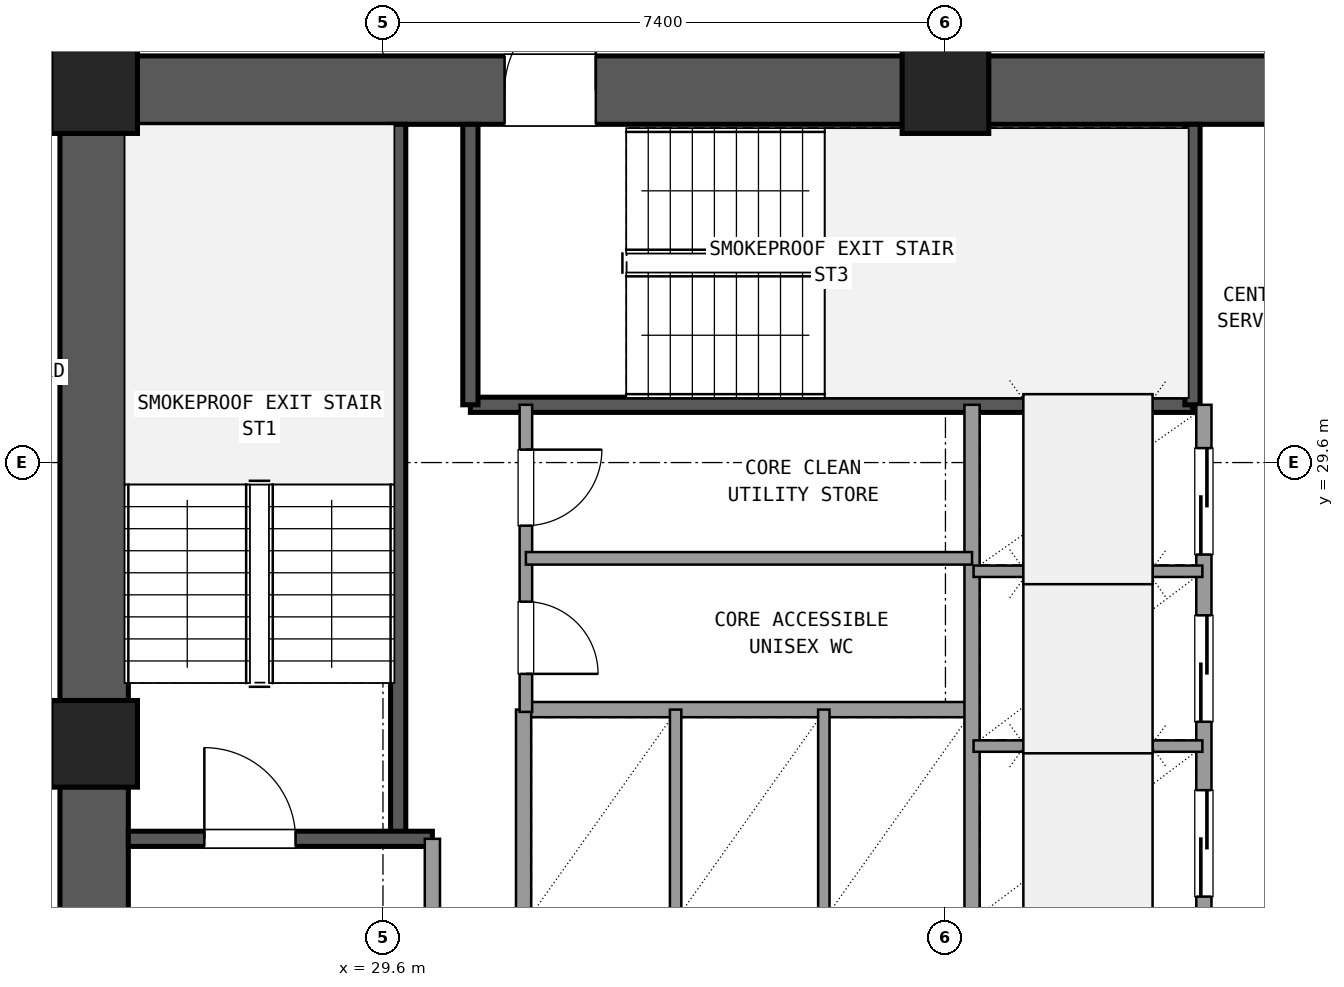
"""IFC4 building model, lengths in metres.
Left out: names, types, materials, properties, quantities, classifications, styles, units other than length and angle.
Written with IfcOpenShell. Run it as: python <this file> out.ifc"""

import sys

from ifc_helpers import new_model, si_unit, direction, frame, frame_2d, origin, origin_2d, place, context, subcontext, project, spatial, rectangle, extrude, element, fill, save


model = new_model("IFC4")
c1 = context("Model", 3, precision=1e-05, world=origin(), true_north=direction((0.0, 1.0)))
c2 = subcontext(c1, "Body", "Model", "MODEL_VIEW")
j1 = project(units=[si_unit("LENGTHUNIT", "METRE"), si_unit("PLANEANGLEUNIT", "RADIAN")], contexts=[c1])
p1 = place(None, origin())
s1 = spatial("IfcSite", under=j1, at=p1, CompositionType="ELEMENT")
p2 = place(p1, origin())
s2 = spatial("IfcBuilding", under=s1, at=p2, CompositionType="ELEMENT")
p3 = place(p2, frame((0.0, 0.0, 63.54)))
s3 = spatial("IfcBuildingStorey", under=s2, at=p3, CompositionType="ELEMENT", Elevation=63.54)
for number, where, z_axis, x_axis in (
    (1, (37.0, 34.5, 0.0), (0.0, 0.0, 1.0), (1.0, 0.0, 0.0)),
    (2, (25.8, 34.5, 0.0), (0.0, 0.0, 1.0), (1.0, 0.0, 0.0)),
    (3, (25.8, 25.9, 0.0), (0.0, 0.0, 1.0), (1.0, 0.0, 0.0)),
):
    element("IfcColumn", number, at=place(p3, frame(where, z_axis=z_axis, x_axis=x_axis)), inside=s3, PredefinedType="COLUMN", context=c2, shape_type="SweptSolid", body=[
        extrude(rectangle(XDim=1.14, YDim=1.14, at=origin_2d()), origin(), (0.0, 0.0, 1.0), 3.6),
    ])
p4 = place(p3, frame((47.635, 34.5, 0.0), z_axis=(0.0, 0.0, 1.0), x_axis=(-1.0, 0.0, 0.0)))
e4 = element("IfcWall", 4, at=p4, inside=s3, PredefinedType="SHEAR", context=c2, shape_type="SweptSolid", body=[
    extrude(rectangle(XDim=10.07, YDim=0.9, at=frame_2d((5.035, 0.0))), origin(), (0.0, 0.0, 1.0), 3.32),
])
p5 = place(p4, frame((4.535, 0.0, 0.0)))
e5 = element("IfcOpeningElement", 5, at=p5, cuts=e4, PredefinedType="OPENING", context=c2, shape_type="SweptSolid", body=[
    extrude(rectangle(XDim=1.6, YDim=2.2, at=frame_2d((0.8, 1.1))), frame((0.0, 0.46, 0.0), z_axis=(0.0, -1.0, 0.0), x_axis=(1.0, 0.0, 0.0)), (0.0, 0.0, 1.0), 0.92),
])
p6 = place(p3, frame((36.435, 34.5, 0.0), z_axis=(0.0, 0.0, 1.0), x_axis=(-1.0, 0.0, 0.0)))
e6 = element("IfcWall", 6, at=p6, inside=s3, PredefinedType="SHEAR", context=c2, shape_type="SweptSolid", body=[
    extrude(rectangle(XDim=10.07, YDim=0.9, at=frame_2d((5.035, 0.0))), origin(), (0.0, 0.0, 1.0), 3.32),
])
p7 = place(p6, frame((4.035, 0.0, 0.0)))
e7 = element("IfcOpeningElement", 7, at=p7, cuts=e6, PredefinedType="OPENING", context=c2, shape_type="SweptSolid", body=[
    extrude(rectangle(XDim=1.2, YDim=2.15, at=frame_2d((0.6, 1.075))), frame((0.0, 0.46, 0.0), z_axis=(0.0, -1.0, 0.0), x_axis=(1.0, 0.0, 0.0)), (0.0, 0.0, 1.0), 0.92),
])
p8 = place(p3, frame((25.8, 33.935, 0.0), z_axis=(0.0, 0.0, 1.0), x_axis=(0.0, -1.0, 0.0)))
e8 = element("IfcWall", 8, at=p8, inside=s3, PredefinedType="SHEAR", context=c2, shape_type="SweptSolid", body=[
    extrude(rectangle(XDim=7.47, YDim=0.9, at=frame_2d((3.735, 0.0))), origin(), (0.0, 0.0, 1.0), 3.32),
])
p9 = place(p3, frame((25.8, 25.335, 0.0), z_axis=(0.0, 0.0, 1.0), x_axis=(0.0, -1.0, 0.0)))
e9 = element("IfcWall", 9, at=p9, inside=s3, PredefinedType="SHEAR", context=c2, shape_type="SweptSolid", body=[
    extrude(rectangle(XDim=7.47, YDim=0.9, at=frame_2d((3.735, 0.0))), origin(), (0.0, 0.0, 1.0), 3.32),
])
p10 = place(p9, frame((2.085, 0.0, 0.0)))
e10 = element("IfcOpeningElement", 10, at=p10, cuts=e9, PredefinedType="OPENING", context=c2, shape_type="SweptSolid", body=[
    extrude(rectangle(XDim=1.2, YDim=2.15, at=frame_2d((0.6, 1.075))), frame((0.0, 0.46, 0.0), z_axis=(0.0, -1.0, 0.0), x_axis=(1.0, 0.0, 0.0)), (0.0, 0.0, 1.0), 0.92),
])
p11 = place(p3, frame((29.8, 24.65, 0.0), z_axis=(0.0, 0.0, 1.0), x_axis=(0.0, 1.0, 0.0)))
e11 = element("IfcWall", 11, at=p11, inside=s3, PredefinedType="SHEAR", context=c2, shape_type="SweptSolid", body=[
    extrude(rectangle(XDim=9.4, YDim=0.2, at=frame_2d((4.7, 0.0))), origin(), (0.0, 0.0, 1.0), 3.32),
])
p12 = place(p3, frame((26.25, 24.65, 0.0), z_axis=(0.0, 0.0, 1.0), x_axis=(1.0, 0.0, 0.0)))
e12 = element("IfcWall", 12, at=p12, inside=s3, PredefinedType="SHEAR", context=c2, shape_type="SweptSolid", body=[
    extrude(rectangle(XDim=4.0, YDim=0.2, at=frame_2d((2.0, 0.0))), origin(), (0.0, 0.0, 1.0), 3.32),
])
p13 = place(p12, frame((1.0, 0.0, 0.0)))
e13 = element("IfcOpeningElement", 13, at=p13, cuts=e12, PredefinedType="OPENING", context=c2, shape_type="SweptSolid", body=[
    extrude(rectangle(XDim=1.2, YDim=2.15, at=frame_2d((0.6, 1.075))), frame((0.0, 0.11, 0.0), z_axis=(0.0, -1.0, 0.0), x_axis=(1.0, 0.0, 0.0)), (0.0, 0.0, 1.0), 0.22),
])
p14 = place(p3, frame((30.75, 30.36, 0.0), z_axis=(0.0, 0.0, 1.0), x_axis=(1.0, 0.0, 0.0)))
e14 = element("IfcWall", 14, at=p14, inside=s3, PredefinedType="SHEAR", context=c2, shape_type="SweptSolid", body=[
    extrude(rectangle(XDim=9.5, YDim=0.2, at=frame_2d((4.75, 0.0))), origin(), (0.0, 0.0, 1.0), 3.32),
])
for number, where, z_axis, x_axis in (
    (15, (30.75, 30.36, 0.0), (0.0, 0.0, 1.0), (0.0, 1.0, 0.0)),
    (16, (40.25, 30.36, 0.0), (0.0, 0.0, 1.0), (0.0, 1.0, 0.0)),
):
    element("IfcWall", number, at=place(p3, frame(where, z_axis=z_axis, x_axis=x_axis)), inside=s3, PredefinedType="SHEAR", context=c2, shape_type="SweptSolid", body=[
        extrude(rectangle(XDim=3.69, YDim=0.2, at=frame_2d((1.845, 0.0))), origin(), (0.0, 0.0, 1.0), 3.32),
    ])
p15 = place(p3, frame((30.25, 17.75, 0.0), z_axis=(0.0, 0.0, 1.0), x_axis=(0.0, 1.0, 0.0)))
e17 = element("IfcWall", 17, at=p15, inside=s3, PredefinedType="SOLIDWALL", context=c2, shape_type="SweptSolid", body=[
    extrude(rectangle(XDim=6.9, YDim=0.2, at=frame_2d((3.45, 0.0))), origin(), (0.0, 0.0, 1.0), 2.61),
])
p16 = place(p15, frame((4.15, 0.0, 0.0)))
e18 = element("IfcOpeningElement", 18, at=p16, cuts=e17, PredefinedType="OPENING", context=c2, shape_type="SweptSolid", body=[
    extrude(rectangle(XDim=1.2, YDim=2.15, at=frame_2d((0.6, 1.075))), frame((0.0, 0.11, 0.0), z_axis=(0.0, -1.0, 0.0), x_axis=(1.0, 0.0, 0.0)), (0.0, 0.0, 1.0), 0.22),
])
p17 = place(p3, frame((31.45, 26.35, 0.0), z_axis=(0.0, 0.0, 1.0), x_axis=(1.0, 0.0, 0.0)))
e19 = element("IfcWall", 19, at=p17, inside=s3, PredefinedType="SOLIDWALL", context=c2, shape_type="SweptSolid", body=[
    extrude(rectangle(XDim=5.9, YDim=0.2, at=frame_2d((2.95, 0.0))), origin(), (0.0, 0.0, 1.0), 2.61),
])
p18 = place(p3, frame((31.45, 23.54, 0.0), z_axis=(0.0, 0.0, 1.0), x_axis=(0.0, 1.0, 0.0)))
e20 = element("IfcWall", 20, at=p18, inside=s3, PredefinedType="SOLIDWALL", context=c2, shape_type="SweptSolid", body=[
    extrude(rectangle(XDim=2.81, YDim=0.2, at=frame_2d((1.405, 0.0))), origin(), (0.0, 0.0, 1.0), 2.61),
])
for number, where, z_axis, x_axis in (
    (21, (33.45, 23.54, 0.0), (0.0, 0.0, 1.0), (0.0, 1.0, 0.0)),
    (22, (35.4, 23.54, 0.0), (0.0, 0.0, 1.0), (0.0, 1.0, 0.0)),
):
    element("IfcWall", number, at=place(p3, frame(where, z_axis=z_axis, x_axis=x_axis)), inside=s3, PredefinedType="PARTITIONING", context=c2, shape_type="SweptSolid", body=[
        extrude(rectangle(XDim=2.81, YDim=0.15, at=frame_2d((1.405, 0.0))), origin(), (0.0, 0.0, 1.0), 2.61),
    ])
p19 = place(p3, frame((37.35, 23.54, 0.0), z_axis=(0.0, 0.0, 1.0), x_axis=(0.0, 1.0, 0.0)))
e23 = element("IfcWall", 23, at=p19, inside=s3, PredefinedType="SOLIDWALL", context=c2, shape_type="SweptSolid", body=[
    extrude(rectangle(XDim=6.82, YDim=0.2, at=frame_2d((3.41, 0.0))), origin(), (0.0, 0.0, 1.0), 2.61),
])
p20 = place(p3, frame((40.4, 23.54, 0.0), z_axis=(0.0, 0.0, 1.0), x_axis=(0.0, 1.0, 0.0)))
e24 = element("IfcWall", 24, at=p20, inside=s3, PredefinedType="SOLIDWALL", context=c2, shape_type="SweptSolid", body=[
    extrude(rectangle(XDim=6.82, YDim=0.2, at=frame_2d((3.41, 0.0))), origin(), (0.0, 0.0, 1.0), 2.61),
])
p21 = place(p20, frame((0.35, 0.0, 0.0)))
e25 = element("IfcOpeningElement", 25, at=p21, cuts=e24, PredefinedType="OPENING", context=c2, shape_type="SweptSolid", body=[
    extrude(rectangle(XDim=1.4, YDim=2.2, at=frame_2d((0.7, 1.1))), frame((0.0, 0.11, 0.0), z_axis=(0.0, -1.0, 0.0), x_axis=(1.0, 0.0, 0.0)), (0.0, 0.0, 1.0), 0.22),
])
p22 = place(p20, frame((2.65, 0.0, 0.0)))
e26 = element("IfcOpeningElement", 26, at=p22, cuts=e24, PredefinedType="OPENING", context=c2, shape_type="SweptSolid", body=[
    extrude(rectangle(XDim=1.4, YDim=2.2, at=frame_2d((0.7, 1.1))), frame((0.0, 0.11, 0.0), z_axis=(0.0, -1.0, 0.0), x_axis=(1.0, 0.0, 0.0)), (0.0, 0.0, 1.0), 0.22),
])
p23 = place(p20, frame((4.85, 0.0, 0.0)))
e27 = element("IfcOpeningElement", 27, at=p23, cuts=e24, PredefinedType="OPENING", context=c2, shape_type="SweptSolid", body=[
    extrude(rectangle(XDim=1.4, YDim=2.2, at=frame_2d((0.7, 1.1))), frame((0.0, 0.11, 0.0), z_axis=(0.0, -1.0, 0.0), x_axis=(1.0, 0.0, 0.0)), (0.0, 0.0, 1.0), 0.22),
])
for number, where, z_axis, x_axis in (
    (28, (37.37, 25.87, 0.0), (0.0, 0.0, 1.0), (1.0, 0.0, 0.0)),
    (29, (37.37, 28.17, 0.0), (0.0, 0.0, 1.0), (1.0, 0.0, 0.0)),
):
    element("IfcWall", number, at=place(p3, frame(where, z_axis=z_axis, x_axis=x_axis)), inside=s3, PredefinedType="PARTITIONING", context=c2, shape_type="SweptSolid", body=[
        extrude(rectangle(XDim=3.01, YDim=0.15, at=frame_2d((1.505, 0.0))), origin(), (0.0, 0.0, 1.0), 2.61),
    ])
p24 = place(p3, frame((31.48, 26.32, 0.0), z_axis=(0.0, 0.0, 1.0), x_axis=(0.0, 1.0, 0.0)))
e30 = element("IfcWall", 30, at=p24, inside=s3, PredefinedType="PLUMBINGWALL", context=c2, shape_type="SweptSolid", body=[
    extrude(rectangle(XDim=4.04, YDim=0.165, at=frame_2d((2.02, 0.0))), origin(), (0.0, 0.0, 1.0), 2.61),
])
p25 = place(p24, frame((0.5, 0.0, 0.0)))
e31 = element("IfcOpeningElement", 31, at=p25, cuts=e30, PredefinedType="OPENING", context=c2, shape_type="SweptSolid", body=[
    extrude(rectangle(XDim=0.95, YDim=2.1, at=frame_2d((0.475, 1.05))), frame((0.0, 0.093, 0.0), z_axis=(0.0, -1.0, 0.0), x_axis=(1.0, 0.0, 0.0)), (0.0, 0.0, 1.0), 0.185),
])
p26 = place(p24, frame((2.45, 0.0, 0.0)))
e32 = element("IfcOpeningElement", 32, at=p26, cuts=e30, PredefinedType="OPENING", context=c2, shape_type="SweptSolid", body=[
    extrude(rectangle(XDim=1.0, YDim=2.15, at=frame_2d((0.5, 1.075))), frame((0.0, 0.093, 0.0), z_axis=(0.0, -1.0, 0.0), x_axis=(1.0, 0.0, 0.0)), (0.0, 0.0, 1.0), 0.185),
])
p27 = place(p3, frame((31.48, 28.34, 0.0), z_axis=(0.0, 0.0, 1.0), x_axis=(1.0, 0.0, 0.0)))
e33 = element("IfcWall", 33, at=p27, inside=s3, PredefinedType="PLUMBINGWALL", context=c2, shape_type="SweptSolid", body=[
    extrude(rectangle(XDim=5.87, YDim=0.165, at=frame_2d((2.935, 0.0))), origin(), (0.0, 0.0, 1.0), 2.61),
])
p28 = place(p3, frame((37.0, 34.95, 0.0), z_axis=(0.0, 0.0, 1.0), x_axis=(0.0, 1.0, 0.0)))
e34 = element("IfcWall", 34, at=p28, inside=s3, PredefinedType="PARTITIONING", context=c2, shape_type="SweptSolid", body=[
    extrude(rectangle(XDim=2.7, YDim=0.18, at=frame_2d((1.35, 0.0))), origin(), (0.0, 0.0, 1.0), 2.61),
])
p29 = place(p28, frame((0.35, 0.0, 0.0)))
e35 = element("IfcOpeningElement", 35, at=p29, cuts=e34, PredefinedType="OPENING", context=c2, shape_type="SweptSolid", body=[
    extrude(rectangle(XDim=2.0, YDim=2.2, at=frame_2d((1.0, 1.1))), frame((0.0, 0.1, 0.0), z_axis=(0.0, -1.0, 0.0), x_axis=(1.0, 0.0, 0.0)), (0.0, 0.0, 1.0), 0.2),
])
p30 = place(p13, origin())
e36 = element("IfcDoor", 36, at=p30, inside=s3, OperationType="SINGLE_SWING_LEFT", PredefinedType="DOOR", context=c2, shape_type="SweptSolid", body=[
    extrude(rectangle(XDim=1.2, YDim=2.15, at=frame_2d((0.6, 1.075))), frame((0.0, 0.025, 0.0), z_axis=(0.0, -1.0, 0.0), x_axis=(1.0, 0.0, 0.0)), (0.0, 0.0, 1.0), 0.05),
])
fill(e13, e36)
p31 = place(p7, frame((1.2, 0.0, 0.0), z_axis=(0.0, 0.0, 1.0), x_axis=(-1.0, 0.0, 0.0)))
e37 = element("IfcDoor", 37, at=p31, inside=s3, OperationType="SINGLE_SWING_LEFT", PredefinedType="DOOR", context=c2, shape_type="SweptSolid", body=[
    extrude(rectangle(XDim=1.2, YDim=2.15, at=frame_2d((0.6, 1.075))), frame((0.0, 0.025, 0.0), z_axis=(0.0, -1.0, 0.0), x_axis=(1.0, 0.0, 0.0)), (0.0, 0.0, 1.0), 0.05),
])
fill(e7, e37)
p32 = place(p21, origin())
e38 = element("IfcDoor", 38, at=p32, inside=s3, OperationType="SLIDING_TO_LEFT", PredefinedType="DOOR", context=c2, shape_type="SweptSolid", body=[
    extrude(rectangle(XDim=1.4, YDim=2.2, at=frame_2d((0.7, 1.1))), frame((0.0, 0.025, 0.0), z_axis=(0.0, -1.0, 0.0), x_axis=(1.0, 0.0, 0.0)), (0.0, 0.0, 1.0), 0.05),
])
fill(e25, e38)
p33 = place(p22, origin())
e39 = element("IfcDoor", 39, at=p33, inside=s3, OperationType="SLIDING_TO_LEFT", PredefinedType="DOOR", context=c2, shape_type="SweptSolid", body=[
    extrude(rectangle(XDim=1.4, YDim=2.2, at=frame_2d((0.7, 1.1))), frame((0.0, 0.025, 0.0), z_axis=(0.0, -1.0, 0.0), x_axis=(1.0, 0.0, 0.0)), (0.0, 0.0, 1.0), 0.05),
])
fill(e26, e39)
p34 = place(p23, origin())
e40 = element("IfcDoor", 40, at=p34, inside=s3, OperationType="SLIDING_TO_RIGHT", PredefinedType="DOOR", context=c2, shape_type="SweptSolid", body=[
    extrude(rectangle(XDim=1.4, YDim=2.2, at=frame_2d((0.7, 1.1))), frame((0.0, 0.025, 0.0), z_axis=(0.0, -1.0, 0.0), x_axis=(1.0, 0.0, 0.0)), (0.0, 0.0, 1.0), 0.05),
])
fill(e27, e40)
p35 = place(p25, frame((0.95, 0.0, 0.0), z_axis=(0.0, 0.0, 1.0), x_axis=(-1.0, 0.0, 0.0)))
e41 = element("IfcDoor", 41, at=p35, inside=s3, OperationType="SINGLE_SWING_LEFT", PredefinedType="DOOR", context=c2, shape_type="SweptSolid", body=[
    extrude(rectangle(XDim=0.95, YDim=2.1, at=frame_2d((0.475, 1.05))), frame((0.0, 0.025, 0.0), z_axis=(0.0, -1.0, 0.0), x_axis=(1.0, 0.0, 0.0)), (0.0, 0.0, 1.0), 0.05),
])
fill(e31, e41)
p36 = place(p26, frame((1.0, 0.0, 0.0), z_axis=(0.0, 0.0, 1.0), x_axis=(-1.0, 0.0, 0.0)))
e42 = element("IfcDoor", 42, at=p36, inside=s3, OperationType="SINGLE_SWING_RIGHT", PredefinedType="DOOR", context=c2, shape_type="SweptSolid", body=[
    extrude(rectangle(XDim=1.0, YDim=2.15, at=frame_2d((0.5, 1.075))), frame((0.0, 0.025, 0.0), z_axis=(0.0, -1.0, 0.0), x_axis=(1.0, 0.0, 0.0)), (0.0, 0.0, 1.0), 0.05),
])
fill(e32, e42)
save(model, sys.argv[1])
